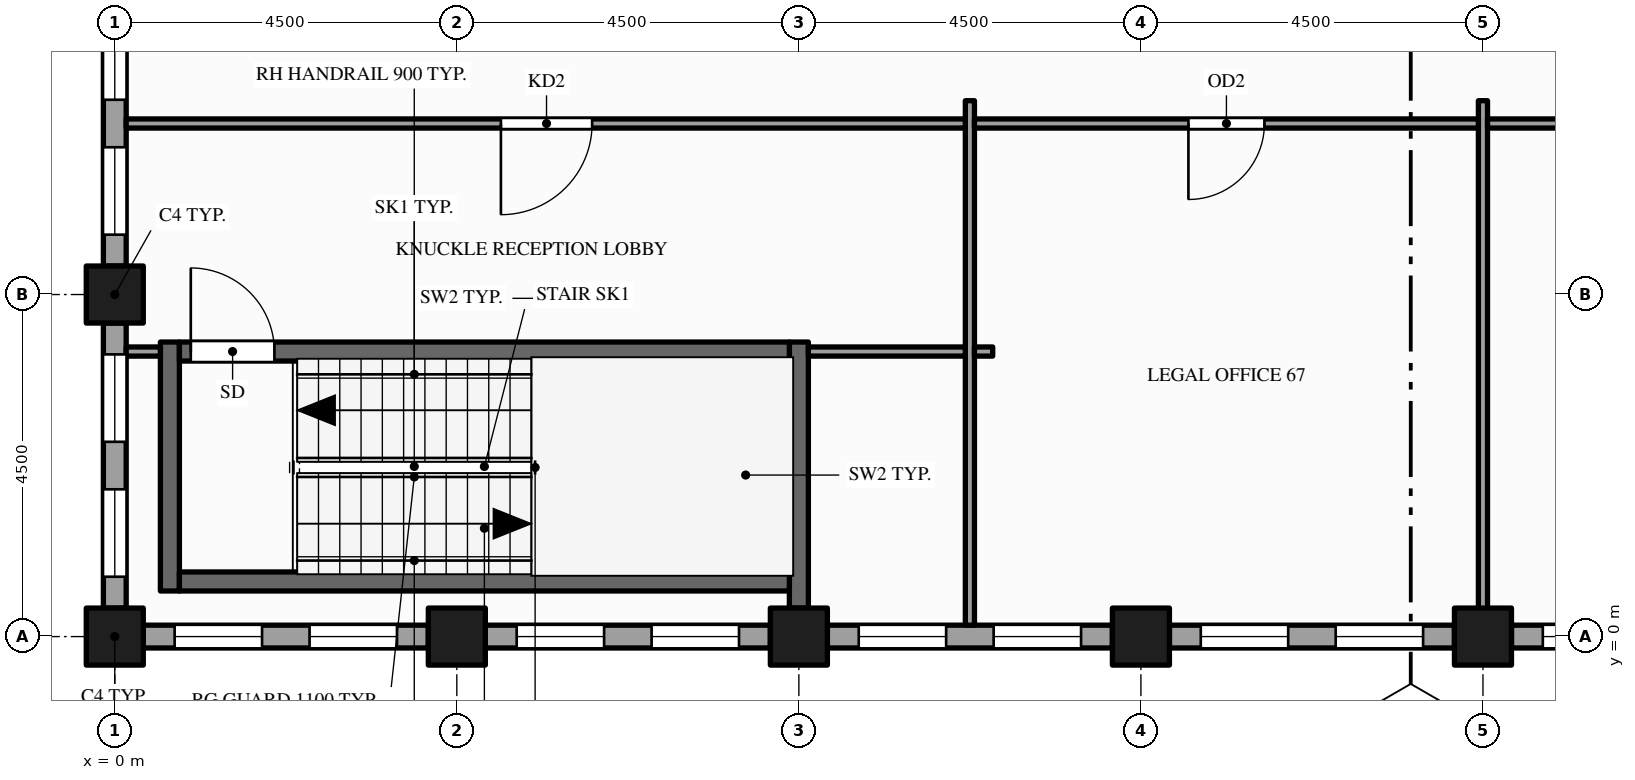
"""IFC4 building model, lengths in metres.
Left out: names, types, materials, properties, quantities, classifications, styles, units other than length and angle.
Written with IfcOpenShell. Run it as: python <this file> out.ifc"""

import sys

from ifc_helpers import new_model, si_unit, direction, frame, frame_2d, origin, origin_2d, place, context, subcontext, project, spatial, rectangle, hollow_rectangle, extrude, element, fill, save


model = new_model("IFC4")
c1 = context("Model", 3, precision=1e-05, world=origin(), true_north=direction((0.0, 1.0)))
c2 = subcontext(c1, "Body", "Model", "MODEL_VIEW")
j1 = project(units=[si_unit("LENGTHUNIT", "METRE"), si_unit("PLANEANGLEUNIT", "RADIAN")], contexts=[c1])
p1 = place(None, origin())
s1 = spatial("IfcSite", under=j1, at=p1, CompositionType="ELEMENT")
p2 = place(p1, origin())
s2 = spatial("IfcBuilding", under=s1, at=p2, CompositionType="ELEMENT")
p3 = place(p2, frame((0.0, 0.0, 223.0)))
s3 = spatial("IfcBuildingStorey", under=s2, at=p3, CompositionType="ELEMENT", Elevation=223.0)
for number, where, z_axis, x_axis in (
    (1, (0.0, 0.0, -0.15), (0.0, 0.0, 1.0), (1.0, 0.0, 0.0)),
    (2, (0.0, 4.5, -0.15), (0.0, 0.0, 1.0), (1.0, 0.0, 0.0)),
    (3, (4.5, 0.0, -0.15), (0.0, 0.0, 1.0), (1.0, 0.0, 0.0)),
    (4, (9.0, 0.0, -0.15), (0.0, 0.0, 1.0), (1.0, 0.0, 0.0)),
    (5, (13.5, 0.0, -0.15), (0.0, 0.0, 1.0), (1.0, 0.0, 0.0)),
    (6, (18.0, 0.0, -0.15), (0.0, 0.0, 1.0), (1.0, 0.0, 0.0)),
):
    element("IfcColumn", number, at=place(p3, frame(where, z_axis=z_axis, x_axis=x_axis)), inside=s3, PredefinedType="COLUMN", context=c2, shape_type="SweptSolid", body=[
        extrude(hollow_rectangle(XDim=0.75, YDim=0.75, WallThickness=0.036, at=origin_2d()), origin(), (0.0, 0.0, 1.0), 4.0),
    ])
p4 = place(p3, frame((0.0, 8.625, 0.0), z_axis=(0.0, 0.0, 1.0), x_axis=(0.0, -1.0, 0.0)))
e7 = element("IfcWall", 7, at=p4, inside=s3, PredefinedType="STANDARD", context=c2, shape_type="SweptSolid", body=[
    extrude(rectangle(XDim=3.75, YDim=0.3, at=frame_2d((1.875, 0.0))), origin(), (0.0, 0.0, 1.0), 3.157),
])
p5 = place(p4, frame((0.413, 0.0, 0.9)))
e8 = element("IfcOpeningElement", 8, at=p5, cuts=e7, PredefinedType="OPENING", context=c2, shape_type="SweptSolid", body=[
    extrude(rectangle(XDim=1.15, YDim=2.0, at=frame_2d((0.575, 1.0))), frame((0.0, 0.16, 0.0), z_axis=(0.0, -1.0, 0.0), x_axis=(1.0, 0.0, 0.0)), (0.0, 0.0, 1.0), 0.32),
])
p6 = place(p4, frame((2.188, 0.0, 0.9)))
e9 = element("IfcOpeningElement", 9, at=p6, cuts=e7, PredefinedType="OPENING", context=c2, shape_type="SweptSolid", body=[
    extrude(rectangle(XDim=1.15, YDim=2.0, at=frame_2d((0.575, 1.0))), frame((0.0, 0.16, 0.0), z_axis=(0.0, -1.0, 0.0), x_axis=(1.0, 0.0, 0.0)), (0.0, 0.0, 1.0), 0.32),
])
p7 = place(p3, frame((0.0, 4.125, 0.0), z_axis=(0.0, 0.0, 1.0), x_axis=(0.0, -1.0, 0.0)))
e10 = element("IfcWall", 10, at=p7, inside=s3, PredefinedType="STANDARD", context=c2, shape_type="SweptSolid", body=[
    extrude(rectangle(XDim=3.75, YDim=0.3, at=frame_2d((1.875, 0.0))), origin(), (0.0, 0.0, 1.0), 3.157),
])
p8 = place(p7, frame((0.413, 0.0, 0.9)))
e11 = element("IfcOpeningElement", 11, at=p8, cuts=e10, PredefinedType="OPENING", context=c2, shape_type="SweptSolid", body=[
    extrude(rectangle(XDim=1.15, YDim=2.0, at=frame_2d((0.575, 1.0))), frame((0.0, 0.16, 0.0), z_axis=(0.0, -1.0, 0.0), x_axis=(1.0, 0.0, 0.0)), (0.0, 0.0, 1.0), 0.32),
])
p9 = place(p7, frame((2.188, 0.0, 0.9)))
e12 = element("IfcOpeningElement", 12, at=p9, cuts=e10, PredefinedType="OPENING", context=c2, shape_type="SweptSolid", body=[
    extrude(rectangle(XDim=1.15, YDim=2.0, at=frame_2d((0.575, 1.0))), frame((0.0, 0.16, 0.0), z_axis=(0.0, -1.0, 0.0), x_axis=(1.0, 0.0, 0.0)), (0.0, 0.0, 1.0), 0.32),
])
p10 = place(p3, frame((0.375, 0.0, 0.0), z_axis=(0.0, 0.0, 1.0), x_axis=(1.0, 0.0, 0.0)))
e13 = element("IfcWall", 13, at=p10, inside=s3, PredefinedType="STANDARD", context=c2, shape_type="SweptSolid", body=[
    extrude(rectangle(XDim=3.75, YDim=0.3, at=frame_2d((1.875, 0.0))), origin(), (0.0, 0.0, 1.0), 3.157),
])
p11 = place(p10, frame((0.413, 0.0, 0.9)))
e14 = element("IfcOpeningElement", 14, at=p11, cuts=e13, PredefinedType="OPENING", context=c2, shape_type="SweptSolid", body=[
    extrude(rectangle(XDim=1.15, YDim=2.0, at=frame_2d((0.575, 1.0))), frame((0.0, 0.16, 0.0), z_axis=(0.0, -1.0, 0.0), x_axis=(1.0, 0.0, 0.0)), (0.0, 0.0, 1.0), 0.32),
])
p12 = place(p10, frame((2.188, 0.0, 0.9)))
e15 = element("IfcOpeningElement", 15, at=p12, cuts=e13, PredefinedType="OPENING", context=c2, shape_type="SweptSolid", body=[
    extrude(rectangle(XDim=1.15, YDim=2.0, at=frame_2d((0.575, 1.0))), frame((0.0, 0.16, 0.0), z_axis=(0.0, -1.0, 0.0), x_axis=(1.0, 0.0, 0.0)), (0.0, 0.0, 1.0), 0.32),
])
p13 = place(p3, frame((4.875, 0.0, 0.0), z_axis=(0.0, 0.0, 1.0), x_axis=(1.0, 0.0, 0.0)))
e16 = element("IfcWall", 16, at=p13, inside=s3, PredefinedType="STANDARD", context=c2, shape_type="SweptSolid", body=[
    extrude(rectangle(XDim=3.75, YDim=0.3, at=frame_2d((1.875, 0.0))), origin(), (0.0, 0.0, 1.0), 3.157),
])
p14 = place(p13, frame((0.413, 0.0, 0.9)))
e17 = element("IfcOpeningElement", 17, at=p14, cuts=e16, PredefinedType="OPENING", context=c2, shape_type="SweptSolid", body=[
    extrude(rectangle(XDim=1.15, YDim=2.0, at=frame_2d((0.575, 1.0))), frame((0.0, 0.16, 0.0), z_axis=(0.0, -1.0, 0.0), x_axis=(1.0, 0.0, 0.0)), (0.0, 0.0, 1.0), 0.32),
])
p15 = place(p13, frame((2.188, 0.0, 0.9)))
e18 = element("IfcOpeningElement", 18, at=p15, cuts=e16, PredefinedType="OPENING", context=c2, shape_type="SweptSolid", body=[
    extrude(rectangle(XDim=1.15, YDim=2.0, at=frame_2d((0.575, 1.0))), frame((0.0, 0.16, 0.0), z_axis=(0.0, -1.0, 0.0), x_axis=(1.0, 0.0, 0.0)), (0.0, 0.0, 1.0), 0.32),
])
p16 = place(p3, frame((9.375, 0.0, 0.0), z_axis=(0.0, 0.0, 1.0), x_axis=(1.0, 0.0, 0.0)))
e19 = element("IfcWall", 19, at=p16, inside=s3, PredefinedType="STANDARD", context=c2, shape_type="SweptSolid", body=[
    extrude(rectangle(XDim=3.75, YDim=0.3, at=frame_2d((1.875, 0.0))), origin(), (0.0, 0.0, 1.0), 2.87),
])
p17 = place(p16, frame((0.413, 0.0, 0.9)))
e20 = element("IfcOpeningElement", 20, at=p17, cuts=e19, PredefinedType="OPENING", context=c2, shape_type="SweptSolid", body=[
    extrude(rectangle(XDim=1.15, YDim=1.75, at=frame_2d((0.575, 0.875))), frame((0.0, 0.16, 0.0), z_axis=(0.0, -1.0, 0.0), x_axis=(1.0, 0.0, 0.0)), (0.0, 0.0, 1.0), 0.32),
])
p18 = place(p16, frame((2.188, 0.0, 0.9)))
e21 = element("IfcOpeningElement", 21, at=p18, cuts=e19, PredefinedType="OPENING", context=c2, shape_type="SweptSolid", body=[
    extrude(rectangle(XDim=1.15, YDim=1.75, at=frame_2d((0.575, 0.875))), frame((0.0, 0.16, 0.0), z_axis=(0.0, -1.0, 0.0), x_axis=(1.0, 0.0, 0.0)), (0.0, 0.0, 1.0), 0.32),
])
p19 = place(p3, frame((13.875, 0.0, 0.0), z_axis=(0.0, 0.0, 1.0), x_axis=(1.0, 0.0, 0.0)))
e22 = element("IfcWall", 22, at=p19, inside=s3, PredefinedType="STANDARD", context=c2, shape_type="SweptSolid", body=[
    extrude(rectangle(XDim=3.75, YDim=0.3, at=frame_2d((1.875, 0.0))), origin(), (0.0, 0.0, 1.0), 2.87),
])
p20 = place(p19, frame((0.413, 0.0, 0.9)))
e23 = element("IfcOpeningElement", 23, at=p20, cuts=e22, PredefinedType="OPENING", context=c2, shape_type="SweptSolid", body=[
    extrude(rectangle(XDim=1.15, YDim=1.75, at=frame_2d((0.575, 0.875))), frame((0.0, 0.16, 0.0), z_axis=(0.0, -1.0, 0.0), x_axis=(1.0, 0.0, 0.0)), (0.0, 0.0, 1.0), 0.32),
])
p21 = place(p19, frame((2.188, 0.0, 0.9)))
e24 = element("IfcOpeningElement", 24, at=p21, cuts=e22, PredefinedType="OPENING", context=c2, shape_type="SweptSolid", body=[
    extrude(rectangle(XDim=1.15, YDim=1.75, at=frame_2d((0.575, 0.875))), frame((0.0, 0.16, 0.0), z_axis=(0.0, -1.0, 0.0), x_axis=(1.0, 0.0, 0.0)), (0.0, 0.0, 1.0), 0.32),
])
p22 = place(p3, frame((18.375, 0.0, 0.0), z_axis=(0.0, 0.0, 1.0), x_axis=(1.0, 0.0, 0.0)))
e25 = element("IfcWall", 25, at=p22, inside=s3, PredefinedType="STANDARD", context=c2, shape_type="SweptSolid", body=[
    extrude(rectangle(XDim=3.75, YDim=0.3, at=frame_2d((1.875, 0.0))), origin(), (0.0, 0.0, 1.0), 2.87),
])
p23 = place(p22, frame((0.413, 0.0, 0.9)))
e26 = element("IfcOpeningElement", 26, at=p23, cuts=e25, PredefinedType="OPENING", context=c2, shape_type="SweptSolid", body=[
    extrude(rectangle(XDim=1.15, YDim=1.75, at=frame_2d((0.575, 0.875))), frame((0.0, 0.16, 0.0), z_axis=(0.0, -1.0, 0.0), x_axis=(1.0, 0.0, 0.0)), (0.0, 0.0, 1.0), 0.32),
])
p24 = place(p22, frame((2.188, 0.0, 0.9)))
e27 = element("IfcOpeningElement", 27, at=p24, cuts=e25, PredefinedType="OPENING", context=c2, shape_type="SweptSolid", body=[
    extrude(rectangle(XDim=1.15, YDim=1.75, at=frame_2d((0.575, 0.875))), frame((0.0, 0.16, 0.0), z_axis=(0.0, -1.0, 0.0), x_axis=(1.0, 0.0, 0.0)), (0.0, 0.0, 1.0), 0.32),
])
p25 = place(p3, frame((0.725, 0.6, 0.0), z_axis=(0.0, 0.0, 1.0), x_axis=(0.0, 1.0, 0.0)))
e28 = element("IfcWall", 28, at=p25, inside=s3, PredefinedType="SHEAR", context=c2, shape_type="SweptSolid", body=[
    extrude(rectangle(XDim=3.275, YDim=0.25, at=frame_2d((1.637, 0.0))), origin(), (0.0, 0.0, 1.0), 3.85),
])
p26 = place(p3, frame((9.0, 0.375, 0.0), z_axis=(0.0, 0.0, 1.0), x_axis=(0.0, 1.0, 0.0)))
e29 = element("IfcWall", 29, at=p26, inside=s3, PredefinedType="SHEAR", context=c2, shape_type="SweptSolid", body=[
    extrude(rectangle(XDim=3.5, YDim=0.25, at=frame_2d((1.75, 0.0))), origin(), (0.0, 0.0, 1.0), 3.85),
])
for number, where, z_axis, x_axis in (
    (30, (11.25, 0.15, 0.0), (0.0, 0.0, 1.0), (0.0, 1.0, 0.0)),
    (31, (18.0, 0.15, 0.0), (0.0, 0.0, 1.0), (0.0, 1.0, 0.0)),
):
    element("IfcWall", number, at=place(p3, frame(where, z_axis=z_axis, x_axis=x_axis)), inside=s3, PredefinedType="PARTITIONING", context=c2, shape_type="SweptSolid", body=[
        extrude(rectangle(XDim=6.9, YDim=0.12, at=frame_2d((3.45, 0.0))), origin(), (0.0, 0.0, 1.0), 2.87),
    ])
p27 = place(p3, frame((0.85, 0.725, 0.0), z_axis=(0.0, 0.0, 1.0), x_axis=(1.0, 0.0, 0.0)))
e32 = element("IfcWall", 32, at=p27, inside=s3, PredefinedType="SHEAR", context=c2, shape_type="SweptSolid", body=[
    extrude(rectangle(XDim=8.025, YDim=0.25, at=frame_2d((4.012, 0.0))), origin(), (0.0, 0.0, 1.0), 3.85),
])
p28 = place(p3, frame((0.15, 3.75, 0.0), z_axis=(0.0, 0.0, 1.0), x_axis=(1.0, 0.0, 0.0)))
e33 = element("IfcWall", 33, at=p28, inside=s3, PredefinedType="PARTITIONING", context=c2, shape_type="SweptSolid", body=[
    extrude(rectangle(XDim=0.45, YDim=0.12, at=frame_2d((0.225, 0.0))), origin(), (0.0, 0.0, 1.0), 3.85),
])
p29 = place(p3, frame((0.85, 3.75, 0.0), z_axis=(0.0, 0.0, 1.0), x_axis=(1.0, 0.0, 0.0)))
e34 = element("IfcWall", 34, at=p29, inside=s3, PredefinedType="SHEAR", context=c2, shape_type="SweptSolid", body=[
    extrude(rectangle(XDim=8.025, YDim=0.25, at=frame_2d((4.012, 0.0))), origin(), (0.0, 0.0, 1.0), 3.85),
])
p30 = place(p29, frame((0.15, 0.0, 0.0)))
e35 = element("IfcOpeningElement", 35, at=p30, cuts=e34, PredefinedType="OPENING", context=c2, shape_type="SweptSolid", body=[
    extrude(rectangle(XDim=1.1, YDim=2.1, at=frame_2d((0.55, 1.05))), frame((0.0, 0.135, 0.0), z_axis=(0.0, -1.0, 0.0), x_axis=(1.0, 0.0, 0.0)), (0.0, 0.0, 1.0), 0.27),
])
p31 = place(p3, frame((9.125, 3.75, 0.0), z_axis=(0.0, 0.0, 1.0), x_axis=(1.0, 0.0, 0.0)))
e36 = element("IfcWall", 36, at=p31, inside=s3, PredefinedType="PARTITIONING", context=c2, shape_type="SweptSolid", body=[
    extrude(rectangle(XDim=2.065, YDim=0.12, at=frame_2d((1.032, 0.0))), origin(), (0.0, 0.0, 1.0), 2.87),
])
p32 = place(p3, frame((11.31, 3.75, 0.0), z_axis=(0.0, 0.0, 1.0), x_axis=(1.0, 0.0, 0.0)))
e37 = element("IfcWall", 37, at=p32, inside=s3, PredefinedType="PARTITIONING", context=c2, shape_type="SweptSolid", body=[
    extrude(rectangle(XDim=0.24, YDim=0.12, at=frame_2d((0.12, 0.0))), origin(), (0.0, 0.0, 1.0), 2.87),
])
p33 = place(p3, frame((0.15, 6.75, 0.0), z_axis=(0.0, 0.0, 1.0), x_axis=(1.0, 0.0, 0.0)))
e38 = element("IfcWall", 38, at=p33, inside=s3, PredefinedType="PARTITIONING", context=c2, shape_type="SweptSolid", body=[
    extrude(rectangle(XDim=11.04, YDim=0.12, at=frame_2d((5.52, 0.0))), origin(), (0.0, 0.0, 1.0), 2.87),
])
p34 = place(p33, frame((4.93, 0.0, 0.0)))
e39 = element("IfcOpeningElement", 39, at=p34, cuts=e38, PredefinedType="OPENING", context=c2, shape_type="SweptSolid", body=[
    extrude(rectangle(XDim=1.2, YDim=2.1, at=frame_2d((0.6, 1.05))), frame((0.0, 0.07, 0.0), z_axis=(0.0, -1.0, 0.0), x_axis=(1.0, 0.0, 0.0)), (0.0, 0.0, 1.0), 0.14),
])
p35 = place(p3, frame((11.31, 6.75, 0.0), z_axis=(0.0, 0.0, 1.0), x_axis=(1.0, 0.0, 0.0)))
e40 = element("IfcWall", 40, at=p35, inside=s3, PredefinedType="PARTITIONING", context=c2, shape_type="SweptSolid", body=[
    extrude(rectangle(XDim=6.63, YDim=0.12, at=frame_2d((3.315, 0.0))), origin(), (0.0, 0.0, 1.0), 2.87),
])
p36 = place(p35, frame((2.815, 0.0, 0.0)))
e41 = element("IfcOpeningElement", 41, at=p36, cuts=e40, PredefinedType="OPENING", context=c2, shape_type="SweptSolid", body=[
    extrude(rectangle(XDim=1.0, YDim=2.1, at=frame_2d((0.5, 1.05))), frame((0.0, 0.07, 0.0), z_axis=(0.0, -1.0, 0.0), x_axis=(1.0, 0.0, 0.0)), (0.0, 0.0, 1.0), 0.14),
])
p37 = place(p3, frame((18.06, 6.75, 0.0), z_axis=(0.0, 0.0, 1.0), x_axis=(1.0, 0.0, 0.0)))
e42 = element("IfcWall", 42, at=p37, inside=s3, PredefinedType="PARTITIONING", context=c2, shape_type="SweptSolid", body=[
    extrude(rectangle(XDim=6.63, YDim=0.12, at=frame_2d((3.315, 0.0))), origin(), (0.0, 0.0, 1.0), 2.76),
])
p38 = place(p37, frame((2.865, 0.0, 0.0)))
e43 = element("IfcOpeningElement", 43, at=p38, cuts=e42, PredefinedType="OPENING", context=c2, shape_type="SweptSolid", body=[
    extrude(rectangle(XDim=0.9, YDim=2.1, at=frame_2d((0.45, 1.05))), frame((0.0, 0.07, 0.0), z_axis=(0.0, -1.0, 0.0), x_axis=(1.0, 0.0, 0.0)), (0.0, 0.0, 1.0), 0.14),
])
p39 = place(p5, origin())
e44 = element("IfcWindow", 44, at=p39, inside=s3, PartitioningType="SINGLE_PANEL", PredefinedType="WINDOW", context=c2, shape_type="SweptSolid", body=[
    extrude(rectangle(XDim=1.15, YDim=2.0, at=frame_2d((0.575, 1.0))), frame((0.0, 0.03, 0.0), z_axis=(0.0, -1.0, 0.0), x_axis=(1.0, 0.0, 0.0)), (0.0, 0.0, 1.0), 0.06),
])
fill(e8, e44)
p40 = place(p6, origin())
e45 = element("IfcWindow", 45, at=p40, inside=s3, PartitioningType="SINGLE_PANEL", PredefinedType="WINDOW", context=c2, shape_type="SweptSolid", body=[
    extrude(rectangle(XDim=1.15, YDim=2.0, at=frame_2d((0.575, 1.0))), frame((0.0, 0.03, 0.0), z_axis=(0.0, -1.0, 0.0), x_axis=(1.0, 0.0, 0.0)), (0.0, 0.0, 1.0), 0.06),
])
fill(e9, e45)
p41 = place(p8, origin())
e46 = element("IfcWindow", 46, at=p41, inside=s3, PartitioningType="SINGLE_PANEL", PredefinedType="WINDOW", context=c2, shape_type="SweptSolid", body=[
    extrude(rectangle(XDim=1.15, YDim=2.0, at=frame_2d((0.575, 1.0))), frame((0.0, 0.03, 0.0), z_axis=(0.0, -1.0, 0.0), x_axis=(1.0, 0.0, 0.0)), (0.0, 0.0, 1.0), 0.06),
])
fill(e11, e46)
p42 = place(p9, origin())
e47 = element("IfcWindow", 47, at=p42, inside=s3, PartitioningType="SINGLE_PANEL", PredefinedType="WINDOW", context=c2, shape_type="SweptSolid", body=[
    extrude(rectangle(XDim=1.15, YDim=2.0, at=frame_2d((0.575, 1.0))), frame((0.0, 0.03, 0.0), z_axis=(0.0, -1.0, 0.0), x_axis=(1.0, 0.0, 0.0)), (0.0, 0.0, 1.0), 0.06),
])
fill(e12, e47)
p43 = place(p11, origin())
e48 = element("IfcWindow", 48, at=p43, inside=s3, PartitioningType="SINGLE_PANEL", PredefinedType="WINDOW", context=c2, shape_type="SweptSolid", body=[
    extrude(rectangle(XDim=1.15, YDim=2.0, at=frame_2d((0.575, 1.0))), frame((0.0, 0.03, 0.0), z_axis=(0.0, -1.0, 0.0), x_axis=(1.0, 0.0, 0.0)), (0.0, 0.0, 1.0), 0.06),
])
fill(e14, e48)
p44 = place(p12, origin())
e49 = element("IfcWindow", 49, at=p44, inside=s3, PartitioningType="SINGLE_PANEL", PredefinedType="WINDOW", context=c2, shape_type="SweptSolid", body=[
    extrude(rectangle(XDim=1.15, YDim=2.0, at=frame_2d((0.575, 1.0))), frame((0.0, 0.03, 0.0), z_axis=(0.0, -1.0, 0.0), x_axis=(1.0, 0.0, 0.0)), (0.0, 0.0, 1.0), 0.06),
])
fill(e15, e49)
p45 = place(p14, origin())
e50 = element("IfcWindow", 50, at=p45, inside=s3, PartitioningType="SINGLE_PANEL", PredefinedType="WINDOW", context=c2, shape_type="SweptSolid", body=[
    extrude(rectangle(XDim=1.15, YDim=2.0, at=frame_2d((0.575, 1.0))), frame((0.0, 0.03, 0.0), z_axis=(0.0, -1.0, 0.0), x_axis=(1.0, 0.0, 0.0)), (0.0, 0.0, 1.0), 0.06),
])
fill(e17, e50)
p46 = place(p15, origin())
e51 = element("IfcWindow", 51, at=p46, inside=s3, PartitioningType="SINGLE_PANEL", PredefinedType="WINDOW", context=c2, shape_type="SweptSolid", body=[
    extrude(rectangle(XDim=1.15, YDim=2.0, at=frame_2d((0.575, 1.0))), frame((0.0, 0.03, 0.0), z_axis=(0.0, -1.0, 0.0), x_axis=(1.0, 0.0, 0.0)), (0.0, 0.0, 1.0), 0.06),
])
fill(e18, e51)
p47 = place(p17, origin())
e52 = element("IfcWindow", 52, at=p47, inside=s3, PartitioningType="SINGLE_PANEL", PredefinedType="WINDOW", context=c2, shape_type="SweptSolid", body=[
    extrude(rectangle(XDim=1.15, YDim=1.75, at=frame_2d((0.575, 0.875))), frame((0.0, 0.03, 0.0), z_axis=(0.0, -1.0, 0.0), x_axis=(1.0, 0.0, 0.0)), (0.0, 0.0, 1.0), 0.06),
])
fill(e20, e52)
p48 = place(p18, origin())
e53 = element("IfcWindow", 53, at=p48, inside=s3, PartitioningType="SINGLE_PANEL", PredefinedType="WINDOW", context=c2, shape_type="SweptSolid", body=[
    extrude(rectangle(XDim=1.15, YDim=1.75, at=frame_2d((0.575, 0.875))), frame((0.0, 0.03, 0.0), z_axis=(0.0, -1.0, 0.0), x_axis=(1.0, 0.0, 0.0)), (0.0, 0.0, 1.0), 0.06),
])
fill(e21, e53)
p49 = place(p20, origin())
e54 = element("IfcWindow", 54, at=p49, inside=s3, PartitioningType="SINGLE_PANEL", PredefinedType="WINDOW", context=c2, shape_type="SweptSolid", body=[
    extrude(rectangle(XDim=1.15, YDim=1.75, at=frame_2d((0.575, 0.875))), frame((0.0, 0.03, 0.0), z_axis=(0.0, -1.0, 0.0), x_axis=(1.0, 0.0, 0.0)), (0.0, 0.0, 1.0), 0.06),
])
fill(e23, e54)
p50 = place(p21, origin())
e55 = element("IfcWindow", 55, at=p50, inside=s3, PartitioningType="SINGLE_PANEL", PredefinedType="WINDOW", context=c2, shape_type="SweptSolid", body=[
    extrude(rectangle(XDim=1.15, YDim=1.75, at=frame_2d((0.575, 0.875))), frame((0.0, 0.03, 0.0), z_axis=(0.0, -1.0, 0.0), x_axis=(1.0, 0.0, 0.0)), (0.0, 0.0, 1.0), 0.06),
])
fill(e24, e55)
p51 = place(p23, origin())
e56 = element("IfcWindow", 56, at=p51, inside=s3, PartitioningType="SINGLE_PANEL", PredefinedType="WINDOW", context=c2, shape_type="SweptSolid", body=[
    extrude(rectangle(XDim=1.15, YDim=1.75, at=frame_2d((0.575, 0.875))), frame((0.0, 0.03, 0.0), z_axis=(0.0, -1.0, 0.0), x_axis=(1.0, 0.0, 0.0)), (0.0, 0.0, 1.0), 0.06),
])
fill(e26, e56)
p52 = place(p30, origin())
e57 = element("IfcDoor", 57, at=p52, inside=s3, OperationType="SINGLE_SWING_LEFT", PredefinedType="DOOR", context=c2, shape_type="SweptSolid", body=[
    extrude(rectangle(XDim=1.1, YDim=2.1, at=frame_2d((0.55, 1.05))), frame((0.0, 0.025, 0.0), z_axis=(0.0, -1.0, 0.0), x_axis=(1.0, 0.0, 0.0)), (0.0, 0.0, 1.0), 0.05),
])
fill(e35, e57)
p53 = place(p34, origin())
e58 = element("IfcDoor", 58, at=p53, inside=s3, OperationType="SINGLE_SWING_LEFT", PredefinedType="DOOR", context=c2, shape_type="SweptSolid", body=[
    extrude(rectangle(XDim=1.2, YDim=2.1, at=frame_2d((0.6, 1.05))), frame((0.0, 0.025, 0.0), z_axis=(0.0, -1.0, 0.0), x_axis=(1.0, 0.0, 0.0)), (0.0, 0.0, 1.0), 0.05),
])
fill(e39, e58)
p54 = place(p36, origin())
e59 = element("IfcDoor", 59, at=p54, inside=s3, OperationType="SINGLE_SWING_LEFT", PredefinedType="DOOR", context=c2, shape_type="SweptSolid", body=[
    extrude(rectangle(XDim=1.0, YDim=2.1, at=frame_2d((0.5, 1.05))), frame((0.0, 0.025, 0.0), z_axis=(0.0, -1.0, 0.0), x_axis=(1.0, 0.0, 0.0)), (0.0, 0.0, 1.0), 0.05),
])
fill(e41, e59)
save(model, sys.argv[1])
